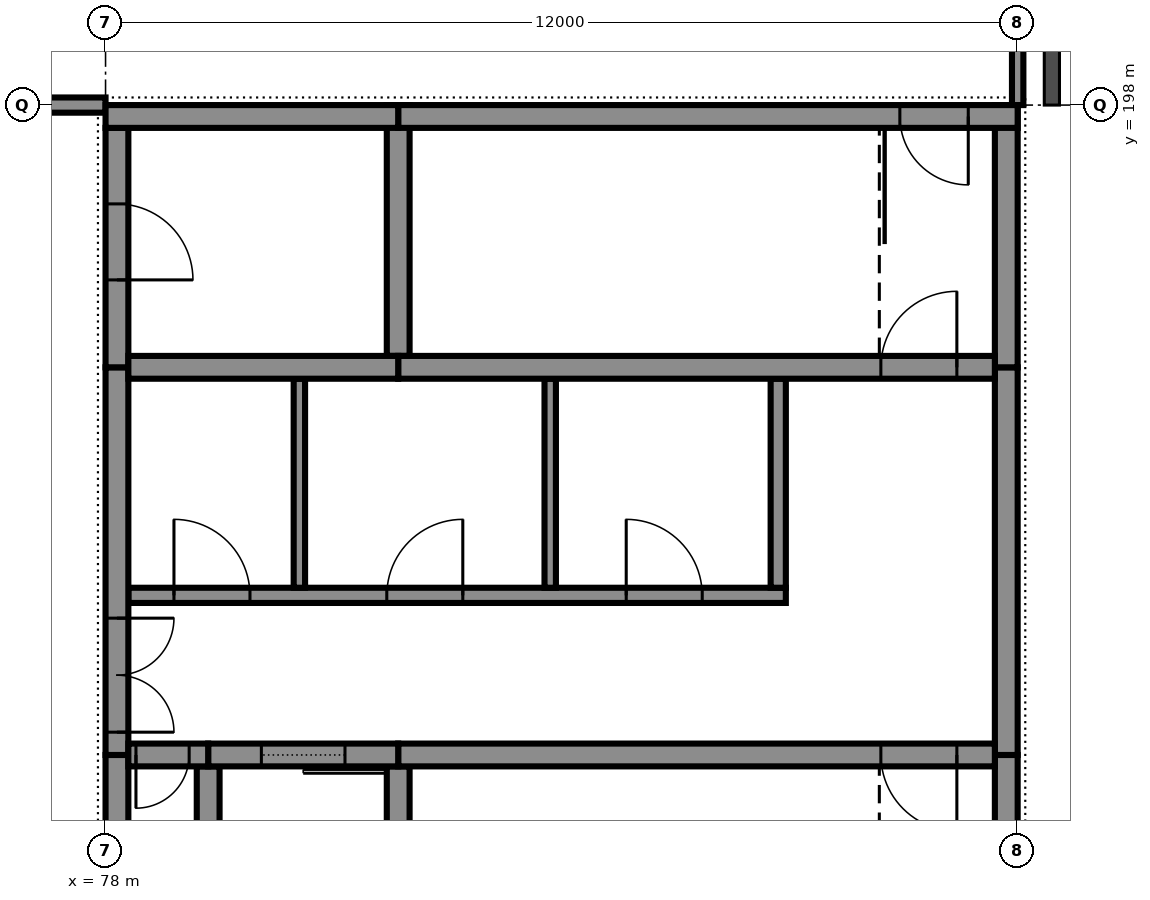
"""IFC4 building model, lengths in metres.
Left out: names, types, materials, properties, quantities, classifications, styles, units other than length and angle.
Written with IfcOpenShell. Run it as: python <this file> out.ifc"""

import sys

from ifc_helpers import new_model, si_unit, direction, frame, frame_2d, origin, place, context, subcontext, project, spatial, rectangle, extrude, element, fill, save


model = new_model("IFC4")
c1 = context("Model", 3, precision=1e-05, world=origin(), true_north=direction((0.0, 1.0)))
c2 = subcontext(c1, "Body", "Model", "MODEL_VIEW")
j1 = project(units=[si_unit("LENGTHUNIT", "METRE"), si_unit("PLANEANGLEUNIT", "RADIAN")], contexts=[c1])
p1 = place(None, origin())
s1 = spatial("IfcSite", under=j1, at=p1, CompositionType="ELEMENT")
p2 = place(p1, origin())
s2 = spatial("IfcBuilding", under=s1, at=p2, CompositionType="ELEMENT")
p3 = place(p2, frame((0.0, 0.0, 6.0)))
s3 = spatial("IfcBuildingStorey", under=s2, at=p3, CompositionType="ELEMENT", Elevation=6.0)
p4 = place(p3, frame((90.0, 197.85, 0.0), z_axis=(0.0, 0.0, 1.0), x_axis=(-1.0, 0.0, 0.0)))
e1 = element("IfcWall", 1, at=p4, inside=s3, PredefinedType="SHEAR", context=c2, shape_type="SweptSolid", body=[
    extrude(rectangle(XDim=8.15, YDim=0.3, at=frame_2d((4.075, 0.0))), origin(), (0.0, 0.0, 1.0), 6.0),
])
p5 = place(p4, frame((0.65, 0.0, 0.0)))
e2 = element("IfcOpeningElement", 2, at=p5, cuts=e1, PredefinedType="OPENING", context=c2, shape_type="SweptSolid", body=[
    extrude(rectangle(XDim=0.9, YDim=2.1, at=frame_2d((0.45, 1.05))), frame((0.0, 0.16, 0.0), z_axis=(0.0, -1.0, 0.0), x_axis=(1.0, 0.0, 0.0)), (0.0, 0.0, 1.0), 0.32),
])
p6 = place(p3, frame((81.85, 197.85, 0.0), z_axis=(0.0, 0.0, 1.0), x_axis=(-1.0, 0.0, 0.0)))
e3 = element("IfcWall", 3, at=p6, inside=s3, PredefinedType="SHEAR", context=c2, shape_type="SweptSolid", body=[
    extrude(rectangle(XDim=3.85, YDim=0.3, at=frame_2d((1.925, 0.0))), origin(), (0.0, 0.0, 1.0), 6.0),
])
p7 = place(p3, frame((89.7, 189.45, 0.0), z_axis=(0.0, 0.0, 1.0), x_axis=(-1.0, 0.0, 0.0)))
e4 = element("IfcWall", 4, at=p7, inside=s3, PredefinedType="SHEAR", context=c2, shape_type="SweptSolid", body=[
    extrude(rectangle(XDim=7.85, YDim=0.3, at=frame_2d((3.925, 0.0))), origin(), (0.0, 0.0, 1.0), 6.0),
])
p8 = place(p7, frame((0.5, 0.0, 0.0)))
e5 = element("IfcOpeningElement", 5, at=p8, cuts=e4, PredefinedType="OPENING", context=c2, shape_type="SweptSolid", body=[
    extrude(rectangle(XDim=1.0, YDim=2.1, at=frame_2d((0.5, 1.05))), frame((0.0, 0.16, 0.0), z_axis=(0.0, -1.0, 0.0), x_axis=(1.0, 0.0, 0.0)), (0.0, 0.0, 1.0), 0.32),
])
p9 = place(p3, frame((81.85, 189.45, 0.0), z_axis=(0.0, 0.0, 1.0), x_axis=(-1.0, 0.0, 0.0)))
e6 = element("IfcWall", 6, at=p9, inside=s3, PredefinedType="SHEAR", context=c2, shape_type="SweptSolid", body=[
    extrude(rectangle(XDim=2.5, YDim=0.3, at=frame_2d((1.25, 0.0))), origin(), (0.0, 0.0, 1.0), 6.0),
])
p10 = place(p9, frame((0.7, 0.0, 0.0)))
e7 = element("IfcOpeningElement", 7, at=p10, cuts=e6, PredefinedType="OPENING", context=c2, shape_type="SweptSolid", body=[
    extrude(rectangle(XDim=1.1, YDim=2.1, at=frame_2d((0.55, 1.05))), frame((0.0, 0.16, 0.0), z_axis=(0.0, -1.0, 0.0), x_axis=(1.0, 0.0, 0.0)), (0.0, 0.0, 1.0), 0.32),
])
p11 = place(p3, frame((79.35, 189.45, 0.0), z_axis=(0.0, 0.0, 1.0), x_axis=(-1.0, 0.0, 0.0)))
e8 = element("IfcWall", 8, at=p11, inside=s3, PredefinedType="SHEAR", context=c2, shape_type="SweptSolid", body=[
    extrude(rectangle(XDim=1.05, YDim=0.3, at=frame_2d((0.525, 0.0))), origin(), (0.0, 0.0, 1.0), 6.0),
])
p12 = place(p11, frame((0.25, 0.0, 0.0)))
e9 = element("IfcOpeningElement", 9, at=p12, cuts=e8, PredefinedType="OPENING", context=c2, shape_type="SweptSolid", body=[
    extrude(rectangle(XDim=0.7, YDim=2.1, at=frame_2d((0.35, 1.05))), frame((0.0, 0.16, 0.0), z_axis=(0.0, -1.0, 0.0), x_axis=(1.0, 0.0, 0.0)), (0.0, 0.0, 1.0), 0.32),
])
p13 = place(p3, frame((89.7, 194.55, 0.0), z_axis=(0.0, 0.0, 1.0), x_axis=(-1.0, 0.0, 0.0)))
e10 = element("IfcWall", 10, at=p13, inside=s3, PredefinedType="SHEAR", context=c2, shape_type="SweptSolid", body=[
    extrude(rectangle(XDim=7.85, YDim=0.3, at=frame_2d((3.925, 0.0))), origin(), (0.0, 0.0, 1.0), 6.0),
])
p14 = place(p13, frame((0.5, 0.0, 0.0)))
e11 = element("IfcOpeningElement", 11, at=p14, cuts=e10, PredefinedType="OPENING", context=c2, shape_type="SweptSolid", body=[
    extrude(rectangle(XDim=1.0, YDim=2.1, at=frame_2d((0.5, 1.05))), frame((0.0, 0.16, 0.0), z_axis=(0.0, -1.0, 0.0), x_axis=(1.0, 0.0, 0.0)), (0.0, 0.0, 1.0), 0.32),
])
p15 = place(p3, frame((81.85, 194.55, 0.0), z_axis=(0.0, 0.0, 1.0), x_axis=(-1.0, 0.0, 0.0)))
e12 = element("IfcWall", 12, at=p15, inside=s3, PredefinedType="SHEAR", context=c2, shape_type="SweptSolid", body=[
    extrude(rectangle(XDim=3.55, YDim=0.3, at=frame_2d((1.775, 0.0))), origin(), (0.0, 0.0, 1.0), 6.0),
])
p16 = place(p3, frame((89.85, 186.3, 0.0), z_axis=(0.0, 0.0, 1.0), x_axis=(0.0, 1.0, 0.0)))
e13 = element("IfcWall", 13, at=p16, inside=s3, PredefinedType="SHEAR", context=c2, shape_type="SweptSolid", body=[
    extrude(rectangle(XDim=3.15, YDim=0.3, at=frame_2d((1.575, 0.0))), origin(), (0.0, 0.0, 1.0), 6.0),
])
p17 = place(p3, frame((89.85, 189.45, 0.0), z_axis=(0.0, 0.0, 1.0), x_axis=(0.0, 1.0, 0.0)))
e14 = element("IfcWall", 14, at=p17, inside=s3, PredefinedType="SHEAR", context=c2, shape_type="SweptSolid", body=[
    extrude(rectangle(XDim=5.1, YDim=0.3, at=frame_2d((2.55, 0.0))), origin(), (0.0, 0.0, 1.0), 6.0),
])
p18 = place(p3, frame((89.85, 194.55, 0.0), z_axis=(0.0, 0.0, 1.0), x_axis=(0.0, 1.0, 0.0)))
e15 = element("IfcWall", 15, at=p18, inside=s3, PredefinedType="SHEAR", context=c2, shape_type="SweptSolid", body=[
    extrude(rectangle(XDim=3.45, YDim=0.3, at=frame_2d((1.725, 0.0))), origin(), (0.0, 0.0, 1.0), 6.0),
])
p19 = place(p3, frame((78.15, 186.3, 0.0), z_axis=(0.0, 0.0, 1.0), x_axis=(0.0, 1.0, 0.0)))
e16 = element("IfcWall", 16, at=p19, inside=s3, PredefinedType="SHEAR", context=c2, shape_type="SweptSolid", body=[
    extrude(rectangle(XDim=3.15, YDim=0.3, at=frame_2d((1.575, 0.0))), origin(), (0.0, 0.0, 1.0), 6.0),
])
p20 = place(p3, frame((78.15, 189.45, 0.0), z_axis=(0.0, 0.0, 1.0), x_axis=(0.0, 1.0, 0.0)))
e17 = element("IfcWall", 17, at=p20, inside=s3, PredefinedType="SHEAR", context=c2, shape_type="SweptSolid", body=[
    extrude(rectangle(XDim=5.1, YDim=0.3, at=frame_2d((2.55, 0.0))), origin(), (0.0, 0.0, 1.0), 6.0),
])
p21 = place(p20, frame((0.3, 0.0, 0.0)))
e18 = element("IfcOpeningElement", 18, at=p21, cuts=e17, PredefinedType="OPENING", context=c2, shape_type="SweptSolid", body=[
    extrude(rectangle(XDim=1.5, YDim=2.1, at=frame_2d((0.75, 1.05))), frame((0.0, 0.16, 0.0), z_axis=(0.0, -1.0, 0.0), x_axis=(1.0, 0.0, 0.0)), (0.0, 0.0, 1.0), 0.32),
])
p22 = place(p3, frame((78.15, 194.55, 0.0), z_axis=(0.0, 0.0, 1.0), x_axis=(0.0, 1.0, 0.0)))
e19 = element("IfcWall", 19, at=p22, inside=s3, PredefinedType="SHEAR", context=c2, shape_type="SweptSolid", body=[
    extrude(rectangle(XDim=3.15, YDim=0.3, at=frame_2d((1.575, 0.0))), origin(), (0.0, 0.0, 1.0), 6.0),
])
p23 = place(p22, frame((1.15, 0.0, 0.0)))
e20 = element("IfcOpeningElement", 20, at=p23, cuts=e19, PredefinedType="OPENING", context=c2, shape_type="SweptSolid", body=[
    extrude(rectangle(XDim=1.0, YDim=2.1, at=frame_2d((0.5, 1.05))), frame((0.0, 0.16, 0.0), z_axis=(0.0, -1.0, 0.0), x_axis=(1.0, 0.0, 0.0)), (0.0, 0.0, 1.0), 0.32),
])
p24 = place(p3, frame((81.85, 186.3, 0.0), z_axis=(0.0, 0.0, 1.0), x_axis=(0.0, 1.0, 0.0)))
e21 = element("IfcWall", 21, at=p24, inside=s3, PredefinedType="SHEAR", context=c2, shape_type="SweptSolid", body=[
    extrude(rectangle(XDim=3.0, YDim=0.3, at=frame_2d((1.5, 0.0))), origin(), (0.0, 0.0, 1.0), 6.0),
])
p25 = place(p3, frame((81.85, 194.7, 0.0), z_axis=(0.0, 0.0, 1.0), x_axis=(0.0, 1.0, 0.0)))
e22 = element("IfcWall", 22, at=p25, inside=s3, PredefinedType="SHEAR", context=c2, shape_type="SweptSolid", body=[
    extrude(rectangle(XDim=3.3, YDim=0.3, at=frame_2d((1.65, 0.0))), origin(), (0.0, 0.0, 1.0), 6.0),
])
p26 = place(p3, frame((79.35, 186.3, 0.0), z_axis=(0.0, 0.0, 1.0), x_axis=(0.0, 1.0, 0.0)))
e23 = element("IfcWall", 23, at=p26, inside=s3, PredefinedType="SHEAR", context=c2, shape_type="SweptSolid", body=[
    extrude(rectangle(XDim=3.0, YDim=0.3, at=frame_2d((1.5, 0.0))), origin(), (0.0, 0.0, 1.0), 6.0),
])
p27 = place(p3, frame((78.3, 191.55, 0.0), z_axis=(0.0, 0.0, 1.0), x_axis=(1.0, 0.0, 0.0)))
e24 = element("IfcWall", 24, at=p27, inside=s3, PredefinedType="PARTITIONING", context=c2, shape_type="SweptSolid", body=[
    extrude(rectangle(XDim=8.65, YDim=0.2, at=frame_2d((4.325, 0.0))), origin(), (0.0, 0.0, 1.0), 10.825),
])
p28 = place(p27, frame((0.6, 0.0, 0.0)))
e25 = element("IfcOpeningElement", 25, at=p28, cuts=e24, PredefinedType="OPENING", context=c2, shape_type="SweptSolid", body=[
    extrude(rectangle(XDim=1.0, YDim=2.1, at=frame_2d((0.5, 1.05))), frame((0.0, 0.11, 0.0), z_axis=(0.0, -1.0, 0.0), x_axis=(1.0, 0.0, 0.0)), (0.0, 0.0, 1.0), 0.22),
])
p29 = place(p27, frame((3.4, 0.0, 0.0)))
e26 = element("IfcOpeningElement", 26, at=p29, cuts=e24, PredefinedType="OPENING", context=c2, shape_type="SweptSolid", body=[
    extrude(rectangle(XDim=1.0, YDim=2.1, at=frame_2d((0.5, 1.05))), frame((0.0, 0.11, 0.0), z_axis=(0.0, -1.0, 0.0), x_axis=(1.0, 0.0, 0.0)), (0.0, 0.0, 1.0), 0.22),
])
p30 = place(p27, frame((6.55, 0.0, 0.0)))
e27 = element("IfcOpeningElement", 27, at=p30, cuts=e24, PredefinedType="OPENING", context=c2, shape_type="SweptSolid", body=[
    extrude(rectangle(XDim=1.0, YDim=2.1, at=frame_2d((0.5, 1.05))), frame((0.0, 0.11, 0.0), z_axis=(0.0, -1.0, 0.0), x_axis=(1.0, 0.0, 0.0)), (0.0, 0.0, 1.0), 0.22),
])
p31 = place(p3, frame((29.925, 198.0, 0.0), z_axis=(0.0, 0.0, 1.0), x_axis=(1.0, 0.0, 0.0)))
e28 = element("IfcWall", 28, at=p31, inside=s3, PredefinedType="PARTITIONING", context=c2, shape_type="SweptSolid", body=[
    extrude(rectangle(XDim=48.075, YDim=0.2, at=frame_2d((24.038, 0.0))), origin(), (0.0, 0.0, 1.0), 4.75),
])
p32 = place(p31, frame((4.875, 0.0, 0.0)))
e29 = element("IfcOpeningElement", 29, at=p32, cuts=e28, PredefinedType="OPENING", context=c2, shape_type="SweptSolid", body=[
    extrude(rectangle(XDim=2.4, YDim=2.4, at=frame_2d((1.2, 1.2))), frame((0.0, 0.11, 0.0), z_axis=(0.0, -1.0, 0.0), x_axis=(1.0, 0.0, 0.0)), (0.0, 0.0, 1.0), 0.22),
])
p33 = place(p31, frame((16.875, 0.0, 0.0)))
e30 = element("IfcOpeningElement", 30, at=p33, cuts=e28, PredefinedType="OPENING", context=c2, shape_type="SweptSolid", body=[
    extrude(rectangle(XDim=2.4, YDim=2.4, at=frame_2d((1.2, 1.2))), frame((0.0, 0.11, 0.0), z_axis=(0.0, -1.0, 0.0), x_axis=(1.0, 0.0, 0.0)), (0.0, 0.0, 1.0), 0.22),
])
p34 = place(p31, frame((28.875, 0.0, 0.0)))
e31 = element("IfcOpeningElement", 31, at=p34, cuts=e28, PredefinedType="OPENING", context=c2, shape_type="SweptSolid", body=[
    extrude(rectangle(XDim=2.4, YDim=2.4, at=frame_2d((1.2, 1.2))), frame((0.0, 0.11, 0.0), z_axis=(0.0, -1.0, 0.0), x_axis=(1.0, 0.0, 0.0)), (0.0, 0.0, 1.0), 0.22),
])
p35 = place(p31, frame((40.875, 0.0, 0.0)))
e32 = element("IfcOpeningElement", 32, at=p35, cuts=e28, PredefinedType="OPENING", context=c2, shape_type="SweptSolid", body=[
    extrude(rectangle(XDim=2.4, YDim=2.4, at=frame_2d((1.2, 1.2))), frame((0.0, 0.11, 0.0), z_axis=(0.0, -1.0, 0.0), x_axis=(1.0, 0.0, 0.0)), (0.0, 0.0, 1.0), 0.22),
])
for number, where, z_axis, x_axis in (
    (33, (80.55, 191.65, 0.0), (0.0, 0.0, 1.0), (0.0, 1.0, 0.0)),
    (34, (83.85, 191.65, 0.0), (0.0, 0.0, 1.0), (0.0, 1.0, 0.0)),
):
    element("IfcWall", number, at=place(p3, frame(where, z_axis=z_axis, x_axis=x_axis)), inside=s3, PredefinedType="PARTITIONING", context=c2, shape_type="SweptSolid", body=[
        extrude(rectangle(XDim=2.75, YDim=0.15, at=frame_2d((1.375, 0.0))), origin(), (0.0, 0.0, 1.0), 10.825),
    ])
p36 = place(p3, frame((86.85, 191.65, 0.0), z_axis=(0.0, 0.0, 1.0), x_axis=(0.0, 1.0, 0.0)))
e35 = element("IfcWall", 35, at=p36, inside=s3, PredefinedType="PARTITIONING", context=c2, shape_type="SweptSolid", body=[
    extrude(rectangle(XDim=2.75, YDim=0.2, at=frame_2d((1.375, 0.0))), origin(), (0.0, 0.0, 1.0), 10.825),
])
p37 = place(p3, frame((90.0, 198.0, 0.0), z_axis=(0.0, 0.0, 1.0), x_axis=(0.0, 1.0, 0.0)))
e36 = element("IfcWall", 36, at=p37, inside=s3, PredefinedType="PARTITIONING", context=c2, shape_type="SweptSolid", body=[
    extrude(rectangle(XDim=12.0, YDim=0.15, at=frame_2d((6.0, 0.0))), origin(), (0.0, 0.0, 1.0), 4.75),
])
p38 = place(p12, origin())
e37 = element("IfcDoor", 37, at=p38, inside=s3, OperationType="SINGLE_SWING_LEFT", PredefinedType="DOOR", context=c2, shape_type="SweptSolid", body=[
    extrude(rectangle(XDim=0.7, YDim=2.1, at=frame_2d((0.35, 1.05))), frame((0.0, 0.025, 0.0), z_axis=(0.0, -1.0, 0.0), x_axis=(1.0, 0.0, 0.0)), (0.0, 0.0, 1.0), 0.05),
])
fill(e9, e37)
p39 = place(p10, origin())
e38 = element("IfcDoor", 38, at=p39, inside=s3, OperationType="SLIDING_TO_LEFT", PredefinedType="DOOR", context=c2, shape_type="SweptSolid", body=[
    extrude(rectangle(XDim=1.1, YDim=2.1, at=frame_2d((0.55, 1.05))), frame((0.0, 0.025, 0.0), z_axis=(0.0, -1.0, 0.0), x_axis=(1.0, 0.0, 0.0)), (0.0, 0.0, 1.0), 0.05),
])
fill(e7, e38)
p40 = place(p8, origin())
e39 = element("IfcDoor", 39, at=p40, inside=s3, OperationType="SINGLE_SWING_RIGHT", PredefinedType="DOOR", context=c2, shape_type="SweptSolid", body=[
    extrude(rectangle(XDim=1.0, YDim=2.1, at=frame_2d((0.5, 1.05))), frame((0.0, 0.025, 0.0), z_axis=(0.0, -1.0, 0.0), x_axis=(1.0, 0.0, 0.0)), (0.0, 0.0, 1.0), 0.05),
])
fill(e5, e39)
p41 = place(p21, frame((1.5, 0.0, 0.0), z_axis=(0.0, 0.0, 1.0), x_axis=(-1.0, 0.0, 0.0)))
e40 = element("IfcDoor", 40, at=p41, inside=s3, OperationType="DOUBLE_DOOR_SINGLE_SWING", PredefinedType="DOOR", context=c2, shape_type="SweptSolid", body=[
    extrude(rectangle(XDim=1.5, YDim=2.1, at=frame_2d((0.75, 1.05))), frame((0.0, 0.025, 0.0), z_axis=(0.0, -1.0, 0.0), x_axis=(1.0, 0.0, 0.0)), (0.0, 0.0, 1.0), 0.05),
])
fill(e18, e40)
p42 = place(p28, origin())
e41 = element("IfcDoor", 41, at=p42, inside=s3, OperationType="SINGLE_SWING_RIGHT", PredefinedType="DOOR", context=c2, shape_type="SweptSolid", body=[
    extrude(rectangle(XDim=1.0, YDim=2.1, at=frame_2d((0.5, 1.05))), frame((0.0, 0.025, 0.0), z_axis=(0.0, -1.0, 0.0), x_axis=(1.0, 0.0, 0.0)), (0.0, 0.0, 1.0), 0.05),
])
fill(e25, e41)
p43 = place(p29, origin())
e42 = element("IfcDoor", 42, at=p43, inside=s3, OperationType="SINGLE_SWING_LEFT", PredefinedType="DOOR", context=c2, shape_type="SweptSolid", body=[
    extrude(rectangle(XDim=1.0, YDim=2.1, at=frame_2d((0.5, 1.05))), frame((0.0, 0.025, 0.0), z_axis=(0.0, -1.0, 0.0), x_axis=(1.0, 0.0, 0.0)), (0.0, 0.0, 1.0), 0.05),
])
fill(e26, e42)
p44 = place(p30, origin())
e43 = element("IfcDoor", 43, at=p44, inside=s3, OperationType="SINGLE_SWING_RIGHT", PredefinedType="DOOR", context=c2, shape_type="SweptSolid", body=[
    extrude(rectangle(XDim=1.0, YDim=2.1, at=frame_2d((0.5, 1.05))), frame((0.0, 0.025, 0.0), z_axis=(0.0, -1.0, 0.0), x_axis=(1.0, 0.0, 0.0)), (0.0, 0.0, 1.0), 0.05),
])
fill(e27, e43)
p45 = place(p14, frame((1.0, 0.0, 0.0), z_axis=(0.0, 0.0, 1.0), x_axis=(-1.0, 0.0, 0.0)))
e44 = element("IfcDoor", 44, at=p45, inside=s3, OperationType="SINGLE_SWING_LEFT", PredefinedType="DOOR", context=c2, shape_type="SweptSolid", body=[
    extrude(rectangle(XDim=1.0, YDim=2.1, at=frame_2d((0.5, 1.05))), frame((0.0, 0.025, 0.0), z_axis=(0.0, -1.0, 0.0), x_axis=(1.0, 0.0, 0.0)), (0.0, 0.0, 1.0), 0.05),
])
fill(e11, e44)
p46 = place(p23, frame((1.0, 0.0, 0.0), z_axis=(0.0, 0.0, 1.0), x_axis=(-1.0, 0.0, 0.0)))
e45 = element("IfcDoor", 45, at=p46, inside=s3, OperationType="SINGLE_SWING_LEFT", PredefinedType="DOOR", context=c2, shape_type="SweptSolid", body=[
    extrude(rectangle(XDim=1.0, YDim=2.1, at=frame_2d((0.5, 1.05))), frame((0.0, 0.025, 0.0), z_axis=(0.0, -1.0, 0.0), x_axis=(1.0, 0.0, 0.0)), (0.0, 0.0, 1.0), 0.05),
])
fill(e20, e45)
p47 = place(p5, origin())
e46 = element("IfcDoor", 46, at=p47, inside=s3, OperationType="SINGLE_SWING_RIGHT", PredefinedType="DOOR", context=c2, shape_type="SweptSolid", body=[
    extrude(rectangle(XDim=0.9, YDim=2.1, at=frame_2d((0.45, 1.05))), frame((0.0, 0.025, 0.0), z_axis=(0.0, -1.0, 0.0), x_axis=(1.0, 0.0, 0.0)), (0.0, 0.0, 1.0), 0.05),
])
fill(e2, e46)
save(model, sys.argv[1])
